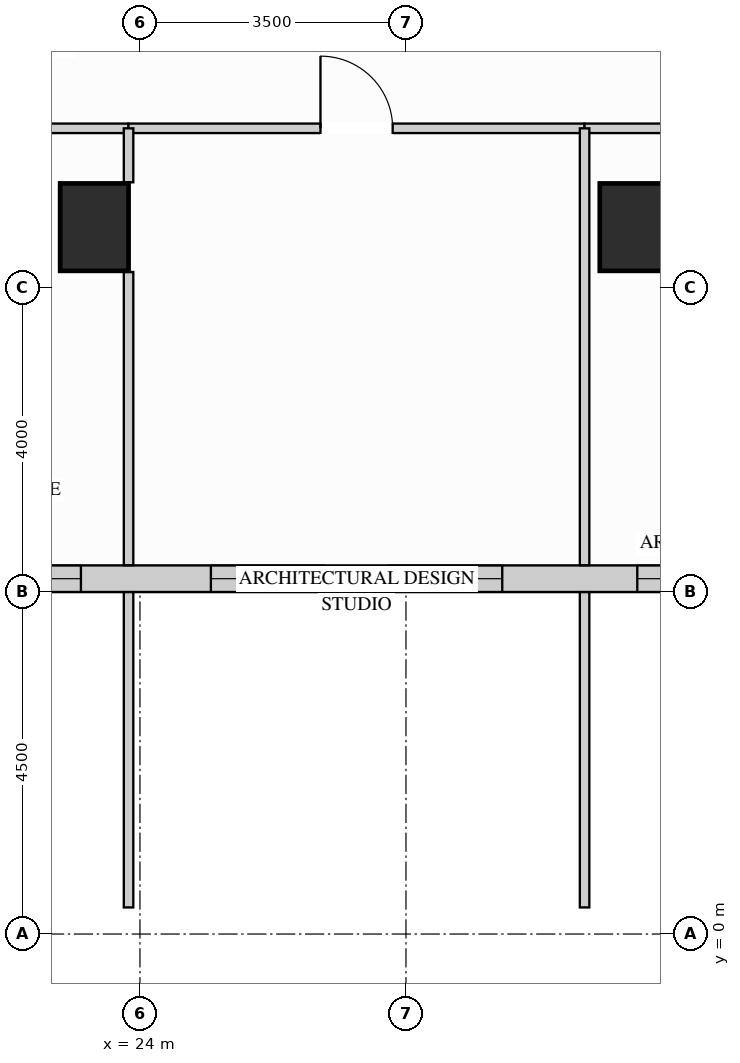
"""IFC4 building model, lengths in metres.
Left out: names, types, materials, properties, quantities, classifications, styles, units other than length and angle.
Written with IfcOpenShell. Run it as: python <this file> out.ifc"""

import sys

from ifc_helpers import new_model, si_unit, direction, frame, frame_2d, origin, origin_2d, place, context, subcontext, project, spatial, rectangle, extrude, source, transform, mapped, element, fill, save


model = new_model("IFC4")
c1 = context("Model", 3, precision=1e-05, world=origin(), true_north=direction((0.0, 1.0)))
c2 = subcontext(c1, "Body", "Model", "MODEL_VIEW")
j1 = project(units=[si_unit("LENGTHUNIT", "METRE"), si_unit("PLANEANGLEUNIT", "RADIAN")], contexts=[c1])
p1 = place(None, origin())
s1 = spatial("IfcSite", under=j1, at=p1, CompositionType="ELEMENT")
p2 = place(p1, origin())
s2 = spatial("IfcBuilding", under=s1, at=p2, CompositionType="ELEMENT")
p3 = place(p2, frame((0.0, 0.0, 84.6)))
s3 = spatial("IfcBuildingStorey", under=s2, at=p3, CompositionType="ELEMENT", Elevation=84.6)
m1 = source(origin(), c2, "Body", "SweptSolid", [
    extrude(rectangle(XDim=0.9, YDim=1.15, at=origin_2d()), origin(), (0.0, 0.0, 1.0), 3.38),
])
for number, where, z_axis, x_axis in (
    (1, (23.4, 9.3, 0.0), (0.0, 0.0, 1.0), (1.0, 0.0, 0.0)),
    (2, (30.5, 9.3, 0.0), (0.0, 0.0, 1.0), (1.0, 0.0, 0.0)),
):
    element("IfcColumn", number, at=place(p3, frame(where, z_axis=z_axis, x_axis=x_axis)), inside=s3, PredefinedType="COLUMN", context=c2, shape_type="MappedRepresentation", body=[
        mapped(m1, transform((0.0, 0.0, 0.0), x_axis=(1.0, 0.0, 0.0), y_axis=(0.0, 1.0, 0.0), z_axis=(0.0, 0.0, 1.0))),
    ])
p4 = place(p3, frame((19.15, 4.675, 0.0), z_axis=(0.0, 0.0, 1.0), x_axis=(1.0, 0.0, 0.0)))
e3 = element("IfcWall", 3, at=p4, inside=s3, PredefinedType="SOLIDWALL", context=c2, shape_type="SweptSolid", body=[
    extrude(rectangle(XDim=15.6, YDim=0.35, at=frame_2d((7.8, 0.0))), origin(), (0.0, 0.0, 1.0), 3.365),
])
p5 = place(p4, frame((0.697, 0.0, 0.78)))
e4 = element("IfcOpeningElement", 4, at=p5, cuts=e3, PredefinedType="OPENING", context=c2, shape_type="SweptSolid", body=[
    extrude(rectangle(XDim=1.5, YDim=2.0, at=frame_2d((0.75, 1.0))), frame((0.0, 0.185, 0.0), z_axis=(0.0, -1.0, 0.0), x_axis=(1.0, 0.0, 0.0)), (0.0, 0.0, 1.0), 0.37),
])
p6 = place(p4, frame((2.573, 0.0, 0.78)))
e5 = element("IfcOpeningElement", 5, at=p6, cuts=e3, PredefinedType="OPENING", context=c2, shape_type="SweptSolid", body=[
    extrude(rectangle(XDim=1.5, YDim=2.0, at=frame_2d((0.75, 1.0))), frame((0.0, 0.185, 0.0), z_axis=(0.0, -1.0, 0.0), x_axis=(1.0, 0.0, 0.0)), (0.0, 0.0, 1.0), 0.37),
])
p7 = place(p4, frame((5.783, 0.0, 0.78)))
e6 = element("IfcOpeningElement", 6, at=p7, cuts=e3, PredefinedType="OPENING", context=c2, shape_type="SweptSolid", body=[
    extrude(rectangle(XDim=1.5, YDim=2.0, at=frame_2d((0.75, 1.0))), frame((0.0, 0.185, 0.0), z_axis=(0.0, -1.0, 0.0), x_axis=(1.0, 0.0, 0.0)), (0.0, 0.0, 1.0), 0.37),
])
p8 = place(p4, frame((8.117, 0.0, 0.78)))
e7 = element("IfcOpeningElement", 7, at=p8, cuts=e3, PredefinedType="OPENING", context=c2, shape_type="SweptSolid", body=[
    extrude(rectangle(XDim=1.5, YDim=2.0, at=frame_2d((0.75, 1.0))), frame((0.0, 0.185, 0.0), z_axis=(0.0, -1.0, 0.0), x_axis=(1.0, 0.0, 0.0)), (0.0, 0.0, 1.0), 0.37),
])
p9 = place(p4, frame((11.393, 0.0, 0.78)))
e8 = element("IfcOpeningElement", 8, at=p9, cuts=e3, PredefinedType="OPENING", context=c2, shape_type="SweptSolid", body=[
    extrude(rectangle(XDim=1.5, YDim=2.0, at=frame_2d((0.75, 1.0))), frame((0.0, 0.185, 0.0), z_axis=(0.0, -1.0, 0.0), x_axis=(1.0, 0.0, 0.0)), (0.0, 0.0, 1.0), 0.37),
])
p10 = place(p4, frame((13.337, 0.0, 0.78)))
e9 = element("IfcOpeningElement", 9, at=p10, cuts=e3, PredefinedType="OPENING", context=c2, shape_type="SweptSolid", body=[
    extrude(rectangle(XDim=1.5, YDim=2.0, at=frame_2d((0.75, 1.0))), frame((0.0, 0.185, 0.0), z_axis=(0.0, -1.0, 0.0), x_axis=(1.0, 0.0, 0.0)), (0.0, 0.0, 1.0), 0.37),
])
p11 = place(p3, frame((19.5, 10.6, 0.0), z_axis=(0.0, 0.0, 1.0), x_axis=(1.0, 0.0, 0.0)))
e10 = element("IfcWall", 10, at=p11, inside=s3, PredefinedType="PARTITIONING", context=c2, shape_type="SweptSolid", body=[
    extrude(rectangle(XDim=4.35, YDim=0.125, at=frame_2d((2.175, 0.0))), origin(), (0.0, 0.0, 1.0), 3.365),
])
p12 = place(p11, frame((1.7, 0.0, 0.0)))
e11 = element("IfcOpeningElement", 11, at=p12, cuts=e10, PredefinedType="OPENING", context=c2, shape_type="SweptSolid", body=[
    extrude(rectangle(XDim=0.95, YDim=2.15, at=frame_2d((0.475, 1.075))), frame((0.0, 0.073, 0.0), z_axis=(0.0, -1.0, 0.0), x_axis=(1.0, 0.0, 0.0)), (0.0, 0.0, 1.0), 0.145),
])
p13 = place(p3, frame((23.85, 10.6, 0.0), z_axis=(0.0, 0.0, 1.0), x_axis=(1.0, 0.0, 0.0)))
e12 = element("IfcWall", 12, at=p13, inside=s3, PredefinedType="PARTITIONING", context=c2, shape_type="SweptSolid", body=[
    extrude(rectangle(XDim=6.0, YDim=0.125, at=frame_2d((3.0, 0.0))), origin(), (0.0, 0.0, 1.0), 3.365),
])
p14 = place(p13, frame((2.525, 0.0, 0.0)))
e13 = element("IfcOpeningElement", 13, at=p14, cuts=e12, PredefinedType="OPENING", context=c2, shape_type="SweptSolid", body=[
    extrude(rectangle(XDim=0.95, YDim=2.15, at=frame_2d((0.475, 1.075))), frame((0.0, 0.073, 0.0), z_axis=(0.0, -1.0, 0.0), x_axis=(1.0, 0.0, 0.0)), (0.0, 0.0, 1.0), 0.145),
])
p15 = place(p3, frame((29.85, 10.6, 0.0), z_axis=(0.0, 0.0, 1.0), x_axis=(1.0, 0.0, 0.0)))
e14 = element("IfcWall", 14, at=p15, inside=s3, PredefinedType="PARTITIONING", context=c2, shape_type="SweptSolid", body=[
    extrude(rectangle(XDim=4.55, YDim=0.125, at=frame_2d((2.275, 0.0))), origin(), (0.0, 0.0, 1.0), 3.365),
])
p16 = place(p15, frame((1.8, 0.0, 0.0)))
e15 = element("IfcOpeningElement", 15, at=p16, cuts=e14, PredefinedType="OPENING", context=c2, shape_type="SweptSolid", body=[
    extrude(rectangle(XDim=0.95, YDim=2.15, at=frame_2d((0.475, 1.075))), frame((0.0, 0.073, 0.0), z_axis=(0.0, -1.0, 0.0), x_axis=(1.0, 0.0, 0.0)), (0.0, 0.0, 1.0), 0.145),
])
m2 = source(origin(), c2, "Body", "SweptSolid", [
    extrude(rectangle(XDim=4.148, YDim=0.125, at=frame_2d((2.074, 0.0))), origin(), (0.0, 0.0, 1.0), 3.365),
])
p17 = place(p3, frame((23.85, 0.35, 0.0), z_axis=(0.0, 0.0, 1.0), x_axis=(0.0, 1.0, 0.0)))
e16 = element("IfcWall", 16, at=p17, inside=s3, PredefinedType="PARTITIONING", context=c2, shape_type="MappedRepresentation", body=[
    mapped(m2, transform((0.0, 0.0, 0.0), x_axis=(1.0, 0.0, 0.0), y_axis=(0.0, 1.0, 0.0), z_axis=(0.0, 0.0, 1.0))),
])
m3 = source(origin(), c2, "Body", "SweptSolid", [
    extrude(rectangle(XDim=3.858, YDim=0.125, at=frame_2d((1.929, 0.0))), origin(), (0.0, 0.0, 1.0), 3.365),
])
p18 = place(p3, frame((23.85, 4.852, 0.0), z_axis=(0.0, 0.0, 1.0), x_axis=(0.0, 1.0, 0.0)))
e17 = element("IfcWall", 17, at=p18, inside=s3, PredefinedType="PARTITIONING", context=c2, shape_type="MappedRepresentation", body=[
    mapped(m3, transform((0.0, 0.0, 0.0), x_axis=(1.0, 0.0, 0.0), y_axis=(0.0, 1.0, 0.0), z_axis=(0.0, 0.0, 1.0))),
])
m4 = source(origin(), c2, "Body", "SweptSolid", [
    extrude(rectangle(XDim=0.71, YDim=0.125, at=frame_2d((0.355, 0.0))), origin(), (0.0, 0.0, 1.0), 3.365),
])
p19 = place(p3, frame((23.85, 9.89, 0.0), z_axis=(0.0, 0.0, 1.0), x_axis=(0.0, 1.0, 0.0)))
e18 = element("IfcWall", 18, at=p19, inside=s3, PredefinedType="PARTITIONING", context=c2, shape_type="MappedRepresentation", body=[
    mapped(m4, transform((0.0, 0.0, 0.0), x_axis=(1.0, 0.0, 0.0), y_axis=(0.0, 1.0, 0.0), z_axis=(0.0, 0.0, 1.0))),
])
p20 = place(p3, frame((29.85, 0.35, 0.0), z_axis=(0.0, 0.0, 1.0), x_axis=(0.0, 1.0, 0.0)))
e19 = element("IfcWall", 19, at=p20, inside=s3, PredefinedType="PARTITIONING", context=c2, shape_type="MappedRepresentation", body=[
    mapped(m2, transform((0.0, 0.0, 0.0), x_axis=(1.0, 0.0, 0.0), y_axis=(0.0, 1.0, 0.0), z_axis=(0.0, 0.0, 1.0))),
])
m5 = source(origin(), c2, "Body", "SweptSolid", [
    extrude(rectangle(XDim=5.748, YDim=0.125, at=frame_2d((2.874, 0.0))), origin(), (0.0, 0.0, 1.0), 3.365),
])
p21 = place(p3, frame((29.85, 4.852, 0.0), z_axis=(0.0, 0.0, 1.0), x_axis=(0.0, 1.0, 0.0)))
e20 = element("IfcWall", 20, at=p21, inside=s3, PredefinedType="PARTITIONING", context=c2, shape_type="MappedRepresentation", body=[
    mapped(m5, transform((0.0, 0.0, 0.0), x_axis=(1.0, 0.0, 0.0), y_axis=(0.0, 1.0, 0.0), z_axis=(0.0, 0.0, 1.0))),
])
m6 = source(origin(), c2, "Body", "SweptSolid", [
    extrude(rectangle(XDim=0.95, YDim=2.15, at=frame_2d((0.475, 1.075))), frame((0.0, 0.025, 0.0), z_axis=(0.0, -1.0, 0.0), x_axis=(1.0, 0.0, 0.0)), (0.0, 0.0, 1.0), 0.05),
])
p22 = place(p14, origin())
e21 = element("IfcDoor", 21, at=p22, inside=s3, OperationType="SINGLE_SWING_LEFT", PredefinedType="DOOR", context=c2, shape_type="MappedRepresentation", body=[
    mapped(m6, transform((0.0, 0.0, 0.0), x_axis=(1.0, 0.0, 0.0), y_axis=(0.0, 1.0, 0.0), z_axis=(0.0, 0.0, 1.0))),
])
fill(e13, e21)
m7 = source(origin(), c2, "Body", "SweptSolid", [
    extrude(rectangle(XDim=1.5, YDim=2.0, at=frame_2d((0.75, 1.0))), frame((0.0, 0.03, 0.0), z_axis=(0.0, -1.0, 0.0), x_axis=(1.0, 0.0, 0.0)), (0.0, 0.0, 1.0), 0.06),
])
p23 = place(p6, origin())
e22 = element("IfcWindow", 22, at=p23, inside=s3, PartitioningType="SINGLE_PANEL", PredefinedType="WINDOW", context=c2, shape_type="MappedRepresentation", body=[
    mapped(m7, transform((0.0, 0.0, 0.0), x_axis=(1.0, 0.0, 0.0), y_axis=(0.0, 1.0, 0.0), z_axis=(0.0, 0.0, 1.0))),
])
fill(e5, e22)
p24 = place(p7, origin())
e23 = element("IfcWindow", 23, at=p24, inside=s3, PartitioningType="SINGLE_PANEL", PredefinedType="WINDOW", context=c2, shape_type="MappedRepresentation", body=[
    mapped(m7, transform((0.0, 0.0, 0.0), x_axis=(1.0, 0.0, 0.0), y_axis=(0.0, 1.0, 0.0), z_axis=(0.0, 0.0, 1.0))),
])
fill(e6, e23)
p25 = place(p8, origin())
e24 = element("IfcWindow", 24, at=p25, inside=s3, PartitioningType="SINGLE_PANEL", PredefinedType="WINDOW", context=c2, shape_type="MappedRepresentation", body=[
    mapped(m7, transform((0.0, 0.0, 0.0), x_axis=(1.0, 0.0, 0.0), y_axis=(0.0, 1.0, 0.0), z_axis=(0.0, 0.0, 1.0))),
])
fill(e7, e24)
p26 = place(p9, origin())
e25 = element("IfcWindow", 25, at=p26, inside=s3, PartitioningType="SINGLE_PANEL", PredefinedType="WINDOW", context=c2, shape_type="MappedRepresentation", body=[
    mapped(m7, transform((0.0, 0.0, 0.0), x_axis=(1.0, 0.0, 0.0), y_axis=(0.0, 1.0, 0.0), z_axis=(0.0, 0.0, 1.0))),
])
fill(e8, e25)
save(model, sys.argv[1])
